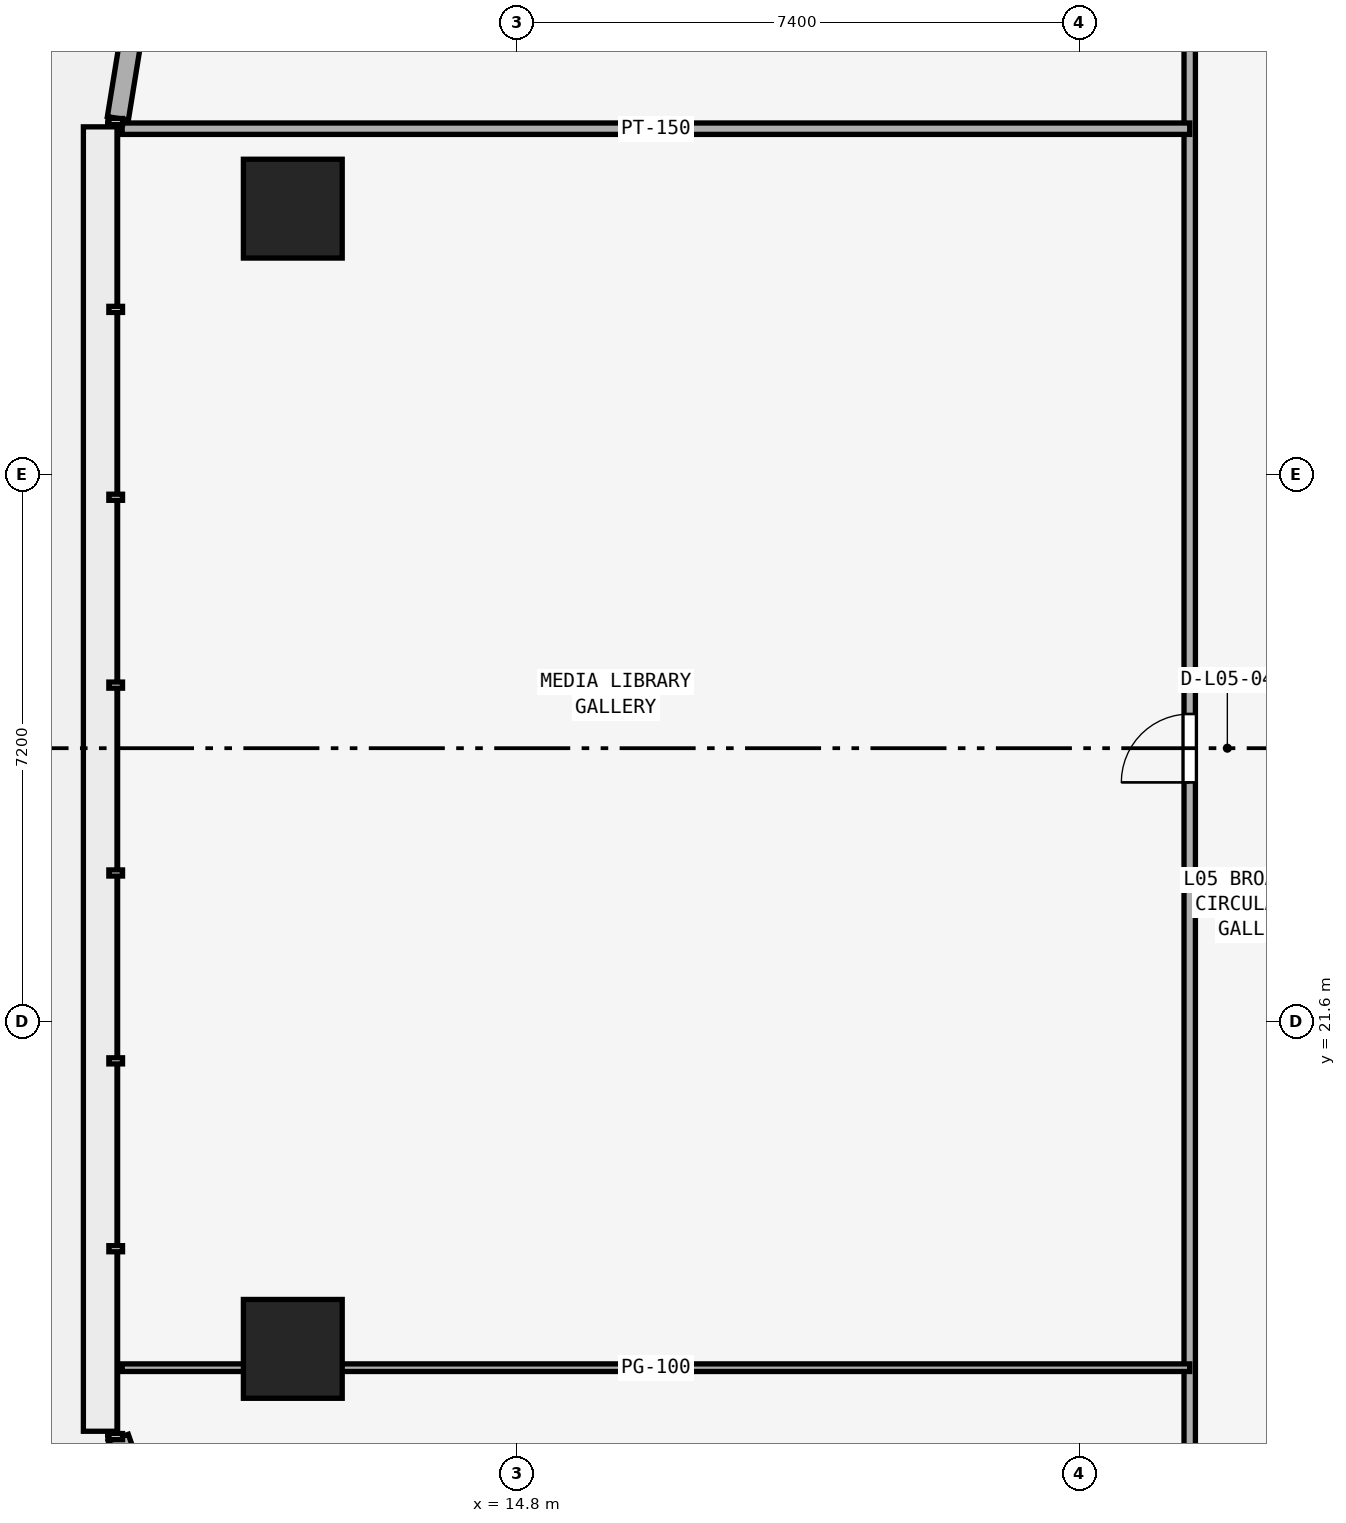
"""IFC4 building model, lengths in metres.
Left out: names, types, materials, properties, quantities, classifications, styles, units other than length and angle.
Written with IfcOpenShell. Run it as: python <this file> out.ifc"""

import sys

from ifc_helpers import new_model, si_unit, direction, frame, frame_2d, origin, origin_2d, place, context, subcontext, project, spatial, rectangle, extrude, element, fill, save


model = new_model("IFC4")
c1 = context("Model", 3, precision=1e-05, world=origin(), true_north=direction((0.0, 1.0)))
c2 = subcontext(c1, "Body", "Model", "MODEL_VIEW")
j1 = project(units=[si_unit("LENGTHUNIT", "METRE"), si_unit("PLANEANGLEUNIT", "RADIAN")], contexts=[c1])
p1 = place(None, origin())
s1 = spatial("IfcSite", under=j1, at=p1, CompositionType="ELEMENT")
p2 = place(p1, origin())
s2 = spatial("IfcBuilding", under=s1, at=p2, CompositionType="ELEMENT")
p3 = place(p2, frame((0.0, 0.0, 25.0)))
s3 = spatial("IfcBuildingStorey", under=s2, at=p3, CompositionType="ELEMENT", Elevation=25.0)
for number, where, z_axis, x_axis in (
    (1, (11.85, 32.298, 0.0), (0.0, 0.0, 1.0), (1.0, 0.0, 0.0)),
    (2, (11.85, 17.298, 0.0), (0.0, 0.0, 1.0), (1.0, 0.0, 0.0)),
):
    element("IfcColumn", number, at=place(p3, frame(where, z_axis=z_axis, x_axis=x_axis)), inside=s3, PredefinedType="COLUMN", context=c2, shape_type="SweptSolid", body=[
        extrude(rectangle(XDim=1.3, YDim=1.3, at=origin_2d()), origin(), (0.0, 0.0, 1.0), 3.8),
    ])
p4 = place(p3, frame((23.65, 15.25, 0.0), z_axis=(0.0, 0.0, 1.0), x_axis=(0.0, 1.0, 0.0)))
e3 = element("IfcWall", 3, at=p4, inside=s3, PredefinedType="PARTITIONING", context=c2, shape_type="SweptSolid", body=[
    extrude(rectangle(XDim=19.9, YDim=0.15, at=frame_2d((9.95, 0.0))), origin(), (0.0, 0.0, 1.0), 3.525),
])
p5 = place(p4, frame((9.5, 0.0, 0.0)))
e4 = element("IfcOpeningElement", 4, at=p5, cuts=e3, PredefinedType="OPENING", context=c2, shape_type="SweptSolid", body=[
    extrude(rectangle(XDim=0.9, YDim=2.1, at=frame_2d((0.45, 1.05))), frame((0.0, 0.085, 0.0), z_axis=(0.0, -1.0, 0.0), x_axis=(1.0, 0.0, 0.0)), (0.0, 0.0, 1.0), 0.17),
])
p6 = place(p3, frame((9.605, 17.05, 0.0), z_axis=(0.0, 0.0, 1.0), x_axis=(1.0, 0.0, 0.0)))
e5 = element("IfcWall", 5, at=p6, inside=s3, PredefinedType="PARTITIONING", context=c2, shape_type="SweptSolid", body=[
    extrude(rectangle(XDim=14.045, YDim=0.1, at=frame_2d((7.022, 0.0))), origin(), (0.0, 0.0, 1.0), 3.525),
])
p7 = place(p3, frame((9.605, 33.35, 0.0), z_axis=(0.0, 0.0, 1.0), x_axis=(1.0, 0.0, 0.0)))
e6 = element("IfcWall", 6, at=p7, inside=s3, PredefinedType="PARTITIONING", context=c2, shape_type="SweptSolid", body=[
    extrude(rectangle(XDim=14.045, YDim=0.15, at=frame_2d((7.022, 0.0))), origin(), (0.0, 0.0, 1.0), 3.525),
])
p8 = place(p3, frame((9.753, 34.749, 0.0), z_axis=(0.0, 0.0, 1.0), x_axis=(-0.159940475951, -0.987126660643, 0.0)))
e7 = element("IfcWall", 7, at=p8, inside=s3, PredefinedType="STANDARD", context=c2, shape_type="SweptSolid", body=[
    extrude(rectangle(XDim=1.279, YDim=0.28, at=frame_2d((0.64, 0.0))), origin(), (0.0, 0.0, 1.0), 3.525),
])
p9 = place(p3, frame((9.554, 16.128, 0.0), z_axis=(0.0, 0.0, 1.0), x_axis=(0.327019907236, -0.945017449718, 0.0)))
e8 = element("IfcWall", 8, at=p9, inside=s3, PredefinedType="STANDARD", context=c2, shape_type="SweptSolid", body=[
    extrude(rectangle(XDim=2.682, YDim=0.28, at=frame_2d((1.341, 0.0))), origin(), (0.0, 0.0, 1.0), 3.525),
])
p10 = place(p5, origin())
e9 = element("IfcDoor", 9, at=p10, inside=s3, OperationType="SINGLE_SWING_LEFT", PredefinedType="DOOR", context=c2, shape_type="SweptSolid", body=[
    extrude(rectangle(XDim=0.9, YDim=2.1, at=frame_2d((0.45, 1.05))), frame((0.0, 0.025, 0.0), z_axis=(0.0, -1.0, 0.0), x_axis=(1.0, 0.0, 0.0)), (0.0, 0.0, 1.0), 0.05),
])
fill(e4, e9)
save(model, sys.argv[1])
